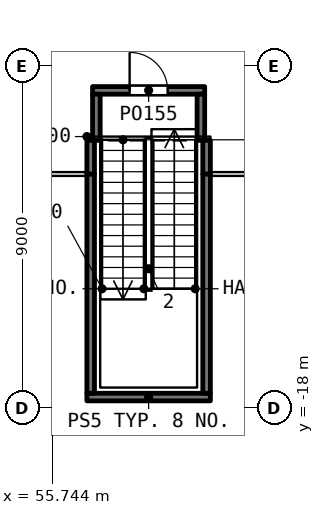
"""IFC4 building model, lengths in metres.
Left out: names, types, materials, properties, quantities, classifications, styles, units other than length and angle.
Written with IfcOpenShell. Run it as: python <this file> out.ifc"""

import sys

from ifc_helpers import new_model, si_unit, direction, frame, frame_2d, origin, place, context, subcontext, project, spatial, rectangle, extrude, element, fill, save


model = new_model("IFC4")
c1 = context("Model", 3, precision=1e-05, world=origin(), true_north=direction((0.0, 1.0)))
c2 = subcontext(c1, "Body", "Model", "MODEL_VIEW")
j1 = project(units=[si_unit("LENGTHUNIT", "METRE"), si_unit("PLANEANGLEUNIT", "RADIAN")], contexts=[c1])
p1 = place(None, origin())
s1 = spatial("IfcSite", under=j1, at=p1, CompositionType="ELEMENT")
p2 = place(p1, origin())
s2 = spatial("IfcBuilding", under=s1, at=p2, CompositionType="ELEMENT")
p3 = place(p2, frame((0.0, 0.0, 12.6)))
s3 = spatial("IfcBuildingStorey", under=s2, at=p3, CompositionType="ELEMENT", Elevation=12.6)
p4 = place(p3, frame((56.65, -17.72, 0.0), z_axis=(0.0, 0.0, 1.0), x_axis=(1.0, 0.0, 0.0)))
e1 = element("IfcWall", 1, at=p4, inside=s3, PredefinedType="SOLIDWALL", context=c2, shape_type="SweptSolid", body=[
    extrude(rectangle(XDim=3.25, YDim=0.2, at=frame_2d((1.625, 0.0))), origin(), (0.0, 0.0, 1.0), 5.1),
])
for number, where, z_axis, x_axis in (
    (2, (56.75, -17.62, 0.0), (0.0, 0.0, 1.0), (0.0, 1.0, 0.0)),
    (3, (59.8, -17.62, 0.0), (0.0, 0.0, 1.0), (0.0, 1.0, 0.0)),
):
    element("IfcWall", number, at=place(p3, frame(where, z_axis=z_axis, x_axis=x_axis)), inside=s3, PredefinedType="SOLIDWALL", context=c2, shape_type="SweptSolid", body=[
        extrude(rectangle(XDim=5.77, YDim=0.2, at=frame_2d((2.885, 0.0))), origin(), (0.0, 0.0, 1.0), 5.1),
    ])
p5 = place(p3, frame((56.8, -9.65, 0.0), z_axis=(0.0, 0.0, 1.0), x_axis=(1.0, 0.0, 0.0)))
e4 = element("IfcWall", 4, at=p5, inside=s3, PredefinedType="SOLIDWALL", context=c2, shape_type="SweptSolid", body=[
    extrude(rectangle(XDim=2.95, YDim=0.2, at=frame_2d((1.475, 0.0))), origin(), (0.0, 0.0, 1.0), 5.1),
])
p6 = place(p5, frame((0.975, 0.0, 0.0)))
e5 = element("IfcOpeningElement", 5, at=p6, cuts=e4, PredefinedType="OPENING", context=c2, shape_type="SweptSolid", body=[
    extrude(rectangle(XDim=1.0, YDim=2.1, at=frame_2d((0.5, 1.05))), frame((0.0, 0.11, 0.0), z_axis=(0.0, -1.0, 0.0), x_axis=(1.0, 0.0, 0.0)), (0.0, 0.0, 1.0), 0.22),
])
p7 = place(p3, frame((56.75, -11.85, 0.0), z_axis=(0.0, 0.0, 1.0), x_axis=(0.0, 1.0, 0.0)))
e6 = element("IfcWall", 6, at=p7, inside=s3, PredefinedType="SOLIDWALL", context=c2, shape_type="SweptSolid", body=[
    extrude(rectangle(XDim=0.885, YDim=0.2, at=frame_2d((0.442, 0.0))), origin(), (0.0, 0.0, 1.0), 5.1),
])
for number, where, z_axis, x_axis in (
    (7, (56.9, -10.965, 0.0), (0.0, 0.0, 1.0), (0.0, 1.0, 0.0)),
    (8, (59.65, -10.965, 0.0), (0.0, 0.0, 1.0), (0.0, 1.0, 0.0)),
):
    element("IfcWall", number, at=place(p3, frame(where, z_axis=z_axis, x_axis=x_axis)), inside=s3, PredefinedType="SOLIDWALL", context=c2, shape_type="SweptSolid", body=[
        extrude(rectangle(XDim=1.215, YDim=0.2, at=frame_2d((0.607, 0.0))), origin(), (0.0, 0.0, 1.0), 5.1),
    ])
p8 = place(p3, frame((59.8, -11.85, 0.0), z_axis=(0.0, 0.0, 1.0), x_axis=(0.0, 1.0, 0.0)))
e9 = element("IfcWall", 9, at=p8, inside=s3, PredefinedType="SOLIDWALL", context=c2, shape_type="SweptSolid", body=[
    extrude(rectangle(XDim=0.885, YDim=0.2, at=frame_2d((0.442, 0.0))), origin(), (0.0, 0.0, 1.0), 5.1),
])
p9 = place(p3, frame((37.585, -11.85, 0.0), z_axis=(0.0, 0.0, 1.0), x_axis=(1.0, 0.0, 0.0)))
e10 = element("IfcWall", 10, at=p9, inside=s3, PredefinedType="PARTITIONING", context=c2, shape_type="SweptSolid", body=[
    extrude(rectangle(XDim=19.065, YDim=0.1, at=frame_2d((9.532, 0.0))), origin(), (0.0, 0.0, 1.0), 5.1),
])
p10 = place(p3, frame((59.9, -11.85, 0.0), z_axis=(0.0, 0.0, 1.0), x_axis=(1.0, 0.0, 0.0)))
e11 = element("IfcWall", 11, at=p10, inside=s3, PredefinedType="PARTITIONING", context=c2, shape_type="SweptSolid", body=[
    extrude(rectangle(XDim=6.7, YDim=0.1, at=frame_2d((3.35, 0.0))), origin(), (0.0, 0.0, 1.0), 5.1),
])
p11 = place(p6, origin())
e12 = element("IfcDoor", 12, at=p11, inside=s3, OperationType="SINGLE_SWING_LEFT", PredefinedType="DOOR", context=c2, shape_type="SweptSolid", body=[
    extrude(rectangle(XDim=1.0, YDim=2.1, at=frame_2d((0.5, 1.05))), frame((0.0, 0.025, 0.0), z_axis=(0.0, -1.0, 0.0), x_axis=(1.0, 0.0, 0.0)), (0.0, 0.0, 1.0), 0.05),
])
fill(e5, e12)
save(model, sys.argv[1])
